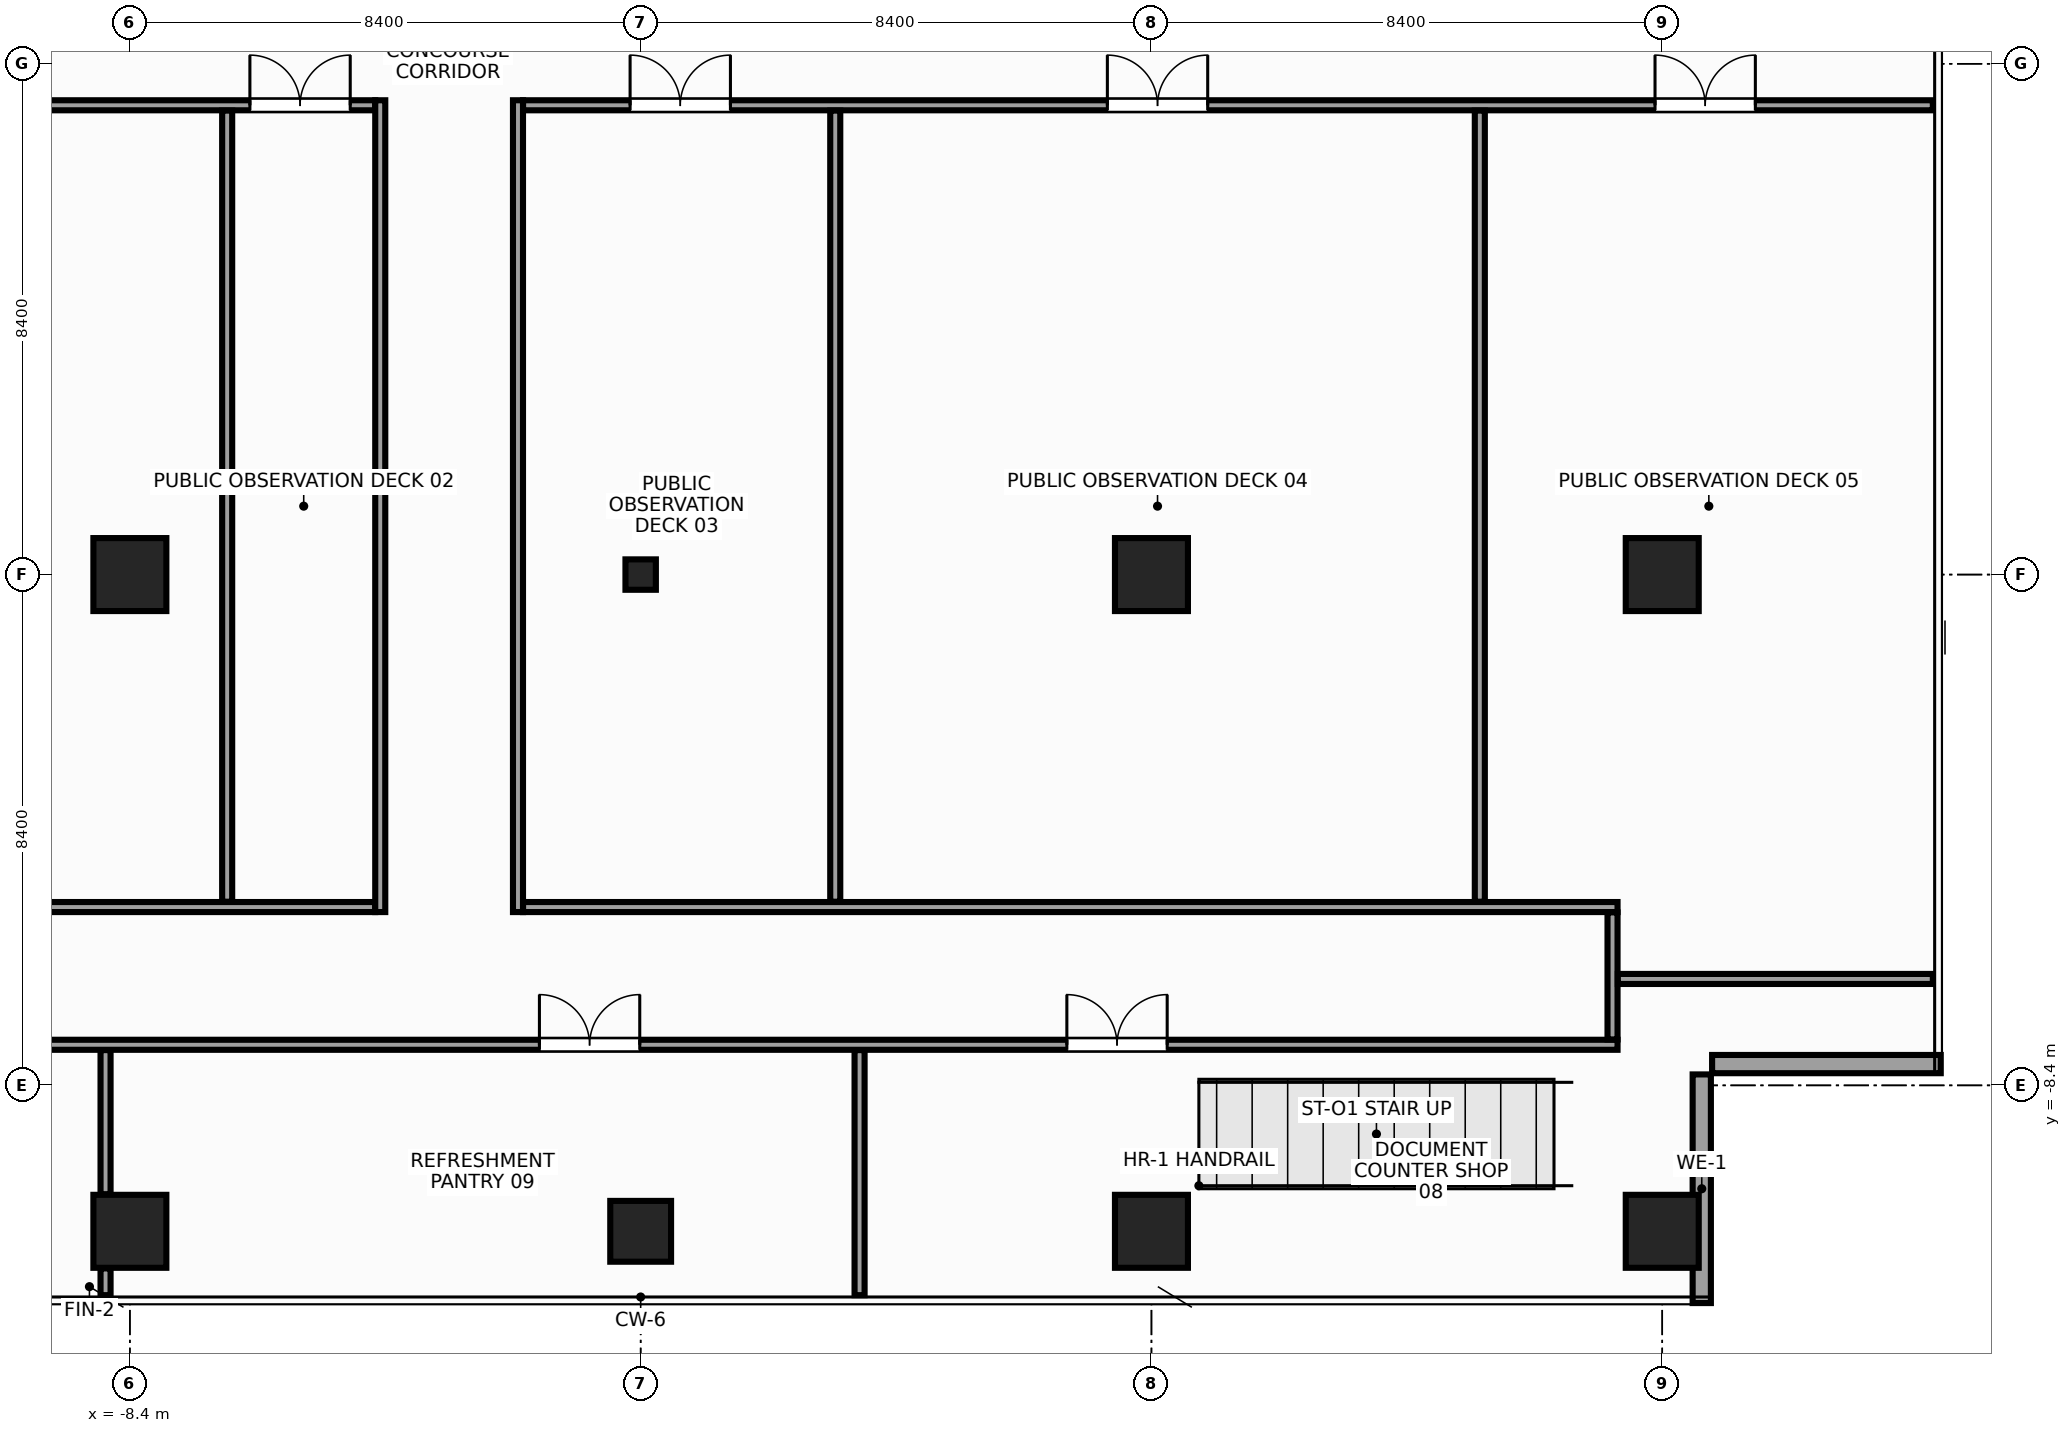
"""IFC4 building model, lengths in metres.
Left out: names, types, materials, properties, quantities, classifications, styles, units other than length and angle.
Written with IfcOpenShell. Run it as: python <this file> out.ifc"""

import sys

from ifc_helpers import new_model, si_unit, direction, frame, frame_2d, origin, origin_with_axes, origin_2d, place, context, subcontext, project, spatial, rectangle, hollow_rectangle, extrude, source, transform, mapped, element, fill, save


model = new_model("IFC4")
c1 = context("Model", 3, precision=1e-05, world=origin(), true_north=direction((0.0, 1.0)))
c2 = subcontext(c1, "Body", "Model", "MODEL_VIEW")
j1 = project(units=[si_unit("LENGTHUNIT", "METRE"), si_unit("PLANEANGLEUNIT", "RADIAN")], contexts=[c1])
p1 = place(None, origin())
s1 = spatial("IfcSite", under=j1, at=p1, CompositionType="ELEMENT")
p2 = place(p1, origin())
s2 = spatial("IfcBuilding", under=s1, at=p2, CompositionType="ELEMENT")
p3 = place(p2, frame((0.0, 0.0, 286.4)))
s3 = spatial("IfcBuildingStorey", under=s2, at=p3, CompositionType="ELEMENT", Elevation=286.4)
m1 = source(origin(), c2, "Body", "SweptSolid", [
    extrude(rectangle(XDim=1.2, YDim=1.2, at=origin_2d()), origin(), (0.0, 0.0, 1.0), 3.6),
])
for number, where, z_axis, x_axis in (
    (1, (16.8, -10.8, 0.0), (0.0, 0.0, 1.0), (1.0, 0.0, 0.0)),
    (2, (16.8, 0.0, 0.0), (0.0, 0.0, 1.0), (1.0, 0.0, 0.0)),
    (3, (-8.4, 0.0, 0.0), (0.0, 0.0, 1.0), (1.0, 0.0, 0.0)),
    (4, (-8.4, -10.8, 0.0), (0.0, 0.0, 1.0), (1.0, 0.0, 0.0)),
    (5, (8.4, 0.0, 0.0), (0.0, 0.0, 1.0), (1.0, 0.0, 0.0)),
    (6, (8.4, -10.8, 0.0), (0.0, 0.0, 1.0), (1.0, 0.0, 0.0)),
):
    element("IfcColumn", number, at=place(p3, frame(where, z_axis=z_axis, x_axis=x_axis)), inside=s3, PredefinedType="COLUMN", context=c2, shape_type="MappedRepresentation", body=[
        mapped(m1, transform((0.0, 0.0, 0.0), x_axis=(1.0, 0.0, 0.0), y_axis=(0.0, 1.0, 0.0), z_axis=(0.0, 0.0, 1.0), scale=1.0)),
    ])
m2 = source(origin(), c2, "Body", "SweptSolid", [
    extrude(rectangle(XDim=1.0, YDim=1.0, at=origin_2d()), origin(), (0.0, 0.0, 1.0), 3.6),
])
p4 = place(p3, frame((0.0, -10.8, 0.0), z_axis=(0.0, 0.0, 1.0), x_axis=(1.0, 0.0, 0.0)))
e7 = element("IfcColumn", 7, at=p4, inside=s3, PredefinedType="COLUMN", context=c2, shape_type="MappedRepresentation", body=[
    mapped(m2, transform((0.0, 0.0, 0.0), x_axis=(1.0, 0.0, 0.0), y_axis=(0.0, 1.0, 0.0), z_axis=(0.0, 0.0, 1.0), scale=1.0)),
])
m3 = source(origin(), c2, "Body", "SweptSolid", [
    extrude(hollow_rectangle(XDim=0.5, YDim=0.5, WallThickness=0.025, at=origin_2d()), origin(), (0.0, 0.0, 1.0), 3.6),
])
p5 = place(p3, origin_with_axes())
e8 = element("IfcColumn", 8, at=p5, inside=s3, PredefinedType="COLUMN", context=c2, shape_type="MappedRepresentation", body=[
    mapped(m3, transform((0.0, 0.0, 0.0), x_axis=(1.0, 0.0, 0.0), y_axis=(0.0, 1.0, 0.0), z_axis=(0.0, 0.0, 1.0), scale=1.0)),
])
m4 = source(origin(), c2, "Body", "SweptSolid", [
    extrude(rectangle(XDim=3.76, YDim=0.3, at=frame_2d((1.88, 0.0))), origin(), (0.0, 0.0, 1.0), 2.75),
])
p6 = place(p3, frame((17.45, -11.98, 0.0), z_axis=(0.0, 0.0, 1.0), x_axis=(0.0, 1.0, 0.0)))
e9 = element("IfcWall", 9, at=p6, inside=s3, PredefinedType="STANDARD", context=c2, shape_type="MappedRepresentation", body=[
    mapped(m4, transform((0.0, 0.0, 0.0), x_axis=(1.0, 0.0, 0.0), y_axis=(0.0, 1.0, 0.0), z_axis=(0.0, 0.0, 1.0), scale=1.0)),
])
m5 = source(origin(), c2, "Body", "SweptSolid", [
    extrude(rectangle(XDim=3.76, YDim=0.3, at=frame_2d((1.88, 0.0))), origin(), (0.0, 0.0, 1.0), 2.75),
])
p7 = place(p3, frame((17.62, -8.05, 0.0), z_axis=(0.0, 0.0, 1.0), x_axis=(1.0, 0.0, 0.0)))
e10 = element("IfcWall", 10, at=p7, inside=s3, PredefinedType="STANDARD", context=c2, shape_type="MappedRepresentation", body=[
    mapped(m5, transform((0.0, 0.0, 0.0), x_axis=(1.0, 0.0, 0.0), y_axis=(0.0, 1.0, 0.0), z_axis=(0.0, 0.0, 1.0), scale=1.0)),
])
m6 = source(origin(), c2, "Body", "SweptSolid", [
    extrude(rectangle(XDim=16.885, YDim=0.165, at=frame_2d((8.442, 0.0))), origin(), (0.0, 0.0, 1.0), 2.755),
])
p8 = place(p3, frame((-21.25, 7.718, 0.0), z_axis=(0.0, 0.0, 1.0), x_axis=(1.0, 0.0, 0.0)))
e11 = element("IfcWall", 11, at=p8, inside=s3, PredefinedType="PARTITIONING", context=c2, shape_type="MappedRepresentation", body=[
    mapped(m6, transform((0.0, 0.0, 0.0), x_axis=(1.0, 0.0, 0.0), y_axis=(0.0, 1.0, 0.0), z_axis=(0.0, 0.0, 1.0), scale=1.0)),
])
p9 = place(p8, frame((9.325, 0.0, 0.0)))
e12 = element("IfcOpeningElement", 12, at=p9, cuts=e11, PredefinedType="OPENING", context=c2, shape_type="SweptSolid", body=[
    extrude(rectangle(XDim=1.65, YDim=2.35, at=frame_2d((0.825, 1.175))), frame((0.0, 0.094, 0.0), z_axis=(0.0, -1.0, 0.0), x_axis=(1.0, 0.0, 0.0)), (0.0, 0.0, 1.0), 0.189),
])
p10 = place(p8, frame((14.824, 0.0, 0.0)))
e13 = element("IfcOpeningElement", 13, at=p10, cuts=e11, PredefinedType="OPENING", context=c2, shape_type="SweptSolid", body=[
    extrude(rectangle(XDim=1.65, YDim=2.35, at=frame_2d((0.825, 1.175))), frame((0.0, 0.094, 0.0), z_axis=(0.0, -1.0, 0.0), x_axis=(1.0, 0.0, 0.0)), (0.0, 0.0, 1.0), 0.189),
])
p11 = place(p8, frame((2.119, 0.0, 0.0)))
e14 = element("IfcOpeningElement", 14, at=p11, cuts=e11, PredefinedType="OPENING", context=c2, shape_type="SweptSolid", body=[
    extrude(rectangle(XDim=1.65, YDim=2.35, at=frame_2d((0.825, 1.175))), frame((0.0, 0.094, 0.0), z_axis=(0.0, -1.0, 0.0), x_axis=(1.0, 0.0, 0.0)), (0.0, 0.0, 1.0), 0.189),
])
m7 = source(origin(), c2, "Body", "SweptSolid", [
    extrude(rectangle(XDim=23.185, YDim=0.165, at=frame_2d((11.593, 0.0))), origin(), (0.0, 0.0, 1.0), 2.755),
])
p12 = place(p3, frame((-1.935, 7.718, 0.0), z_axis=(0.0, 0.0, 1.0), x_axis=(1.0, 0.0, 0.0)))
e15 = element("IfcWall", 15, at=p12, inside=s3, PredefinedType="PARTITIONING", context=c2, shape_type="MappedRepresentation", body=[
    mapped(m7, transform((0.0, 0.0, 0.0), x_axis=(1.0, 0.0, 0.0), y_axis=(0.0, 1.0, 0.0), z_axis=(0.0, 0.0, 1.0), scale=1.0)),
])
p13 = place(p12, frame((1.761, 0.0, 0.0)))
e16 = element("IfcOpeningElement", 16, at=p13, cuts=e15, PredefinedType="OPENING", context=c2, shape_type="SweptSolid", body=[
    extrude(rectangle(XDim=1.65, YDim=2.35, at=frame_2d((0.825, 1.175))), frame((0.0, 0.094, 0.0), z_axis=(0.0, -1.0, 0.0), x_axis=(1.0, 0.0, 0.0)), (0.0, 0.0, 1.0), 0.189),
])
p14 = place(p12, frame((9.61, 0.0, 0.0)))
e17 = element("IfcOpeningElement", 17, at=p14, cuts=e15, PredefinedType="OPENING", context=c2, shape_type="SweptSolid", body=[
    extrude(rectangle(XDim=1.65, YDim=2.35, at=frame_2d((0.825, 1.175))), frame((0.0, 0.094, 0.0), z_axis=(0.0, -1.0, 0.0), x_axis=(1.0, 0.0, 0.0)), (0.0, 0.0, 1.0), 0.189),
])
p15 = place(p12, frame((18.616, 0.0, 0.0)))
e18 = element("IfcOpeningElement", 18, at=p15, cuts=e15, PredefinedType="OPENING", context=c2, shape_type="SweptSolid", body=[
    extrude(rectangle(XDim=1.65, YDim=2.35, at=frame_2d((0.825, 1.175))), frame((0.0, 0.094, 0.0), z_axis=(0.0, -1.0, 0.0), x_axis=(1.0, 0.0, 0.0)), (0.0, 0.0, 1.0), 0.189),
])
m8 = source(origin(), c2, "Body", "SweptSolid", [
    extrude(rectangle(XDim=11.7, YDim=0.165, at=frame_2d((5.85, 0.0))), origin(), (0.0, 0.0, 1.0), 2.755),
])
p16 = place(p3, frame((-16.065, -5.468, 0.0), z_axis=(0.0, 0.0, 1.0), x_axis=(1.0, 0.0, 0.0)))
e19 = element("IfcWall", 19, at=p16, inside=s3, PredefinedType="PARTITIONING", context=c2, shape_type="MappedRepresentation", body=[
    mapped(m8, transform((0.0, 0.0, 0.0), x_axis=(1.0, 0.0, 0.0), y_axis=(0.0, 1.0, 0.0), z_axis=(0.0, 0.0, 1.0), scale=1.0)),
])
m9 = source(origin(), c2, "Body", "SweptSolid", [
    extrude(rectangle(XDim=18.0, YDim=0.165, at=frame_2d((9.0, 0.0))), origin(), (0.0, 0.0, 1.0), 2.755),
])
p17 = place(p3, frame((-1.935, -5.468, 0.0), z_axis=(0.0, 0.0, 1.0), x_axis=(1.0, 0.0, 0.0)))
e20 = element("IfcWall", 20, at=p17, inside=s3, PredefinedType="PARTITIONING", context=c2, shape_type="MappedRepresentation", body=[
    mapped(m9, transform((0.0, 0.0, 0.0), x_axis=(1.0, 0.0, 0.0), y_axis=(0.0, 1.0, 0.0), z_axis=(0.0, 0.0, 1.0), scale=1.0)),
])
m10 = source(origin(), c2, "Body", "SweptSolid", [
    extrude(rectangle(XDim=32.13, YDim=0.165, at=frame_2d((16.065, 0.0))), origin(), (0.0, 0.0, 1.0), 2.755),
])
p18 = place(p3, frame((-16.065, -7.732, 0.0), z_axis=(0.0, 0.0, 1.0), x_axis=(1.0, 0.0, 0.0)))
e21 = element("IfcWall", 21, at=p18, inside=s3, PredefinedType="PARTITIONING", context=c2, shape_type="MappedRepresentation", body=[
    mapped(m10, transform((0.0, 0.0, 0.0), x_axis=(1.0, 0.0, 0.0), y_axis=(0.0, 1.0, 0.0), z_axis=(0.0, 0.0, 1.0), scale=1.0)),
])
p19 = place(p18, frame((2.826, 0.0, 0.0)))
e22 = element("IfcOpeningElement", 22, at=p19, cuts=e21, PredefinedType="OPENING", context=c2, shape_type="SweptSolid", body=[
    extrude(rectangle(XDim=1.65, YDim=2.35, at=frame_2d((0.825, 1.175))), frame((0.0, 0.094, 0.0), z_axis=(0.0, -1.0, 0.0), x_axis=(1.0, 0.0, 0.0)), (0.0, 0.0, 1.0), 0.189),
])
p20 = place(p18, frame((23.074, 0.0, 0.0)))
e23 = element("IfcOpeningElement", 23, at=p20, cuts=e21, PredefinedType="OPENING", context=c2, shape_type="SweptSolid", body=[
    extrude(rectangle(XDim=1.65, YDim=2.35, at=frame_2d((0.825, 1.175))), frame((0.0, 0.094, 0.0), z_axis=(0.0, -1.0, 0.0), x_axis=(1.0, 0.0, 0.0)), (0.0, 0.0, 1.0), 0.189),
])
p21 = place(p18, frame((14.4, 0.0, 0.0)))
e24 = element("IfcOpeningElement", 24, at=p21, cuts=e21, PredefinedType="OPENING", context=c2, shape_type="SweptSolid", body=[
    extrude(rectangle(XDim=1.65, YDim=2.35, at=frame_2d((0.825, 1.175))), frame((0.0, 0.094, 0.0), z_axis=(0.0, -1.0, 0.0), x_axis=(1.0, 0.0, 0.0)), (0.0, 0.0, 1.0), 0.189),
])
m11 = source(origin(), c2, "Body", "SweptSolid", [
    extrude(rectangle(XDim=13.35, YDim=0.165, at=frame_2d((6.675, 0.0))), origin(), (0.0, 0.0, 1.0), 2.655),
])
for number, where, z_axis, x_axis in (
    (25, (-4.282, -5.55, 0.0), (0.0, 0.0, 1.0), (0.0, 1.0, 0.0)),
    (26, (-2.018, -5.55, 0.0), (0.0, 0.0, 1.0), (0.0, 1.0, 0.0)),
):
    element("IfcWall", number, at=place(p3, frame(where, z_axis=z_axis, x_axis=x_axis)), inside=s3, PredefinedType="PARTITIONING", context=c2, shape_type="MappedRepresentation", body=[
        mapped(m11, transform((0.0, 0.0, 0.0), x_axis=(1.0, 0.0, 0.0), y_axis=(0.0, 1.0, 0.0), z_axis=(0.0, 0.0, 1.0), scale=1.0)),
    ])
m12 = source(origin(), c2, "Body", "SweptSolid", [
    extrude(rectangle(XDim=2.09, YDim=0.165, at=frame_2d((1.045, 0.0))), origin(), (0.0, 0.0, 1.0), 3.37),
])
p22 = place(p3, frame((15.982, -7.645, 0.0), z_axis=(0.0, 0.0, 1.0), x_axis=(0.0, 1.0, 0.0)))
e27 = element("IfcWall", 27, at=p22, inside=s3, PredefinedType="PARTITIONING", context=c2, shape_type="MappedRepresentation", body=[
    mapped(m12, transform((0.0, 0.0, 0.0), x_axis=(1.0, 0.0, 0.0), y_axis=(0.0, 1.0, 0.0), z_axis=(0.0, 0.0, 1.0), scale=1.0)),
])
m13 = source(origin(), c2, "Body", "SweptSolid", [
    extrude(rectangle(XDim=5.18, YDim=0.165, at=frame_2d((2.59, 0.0))), origin(), (0.0, 0.0, 1.0), 2.755),
])
p23 = place(p3, frame((16.07, -6.65, 0.0), z_axis=(0.0, 0.0, 1.0), x_axis=(1.0, 0.0, 0.0)))
e28 = element("IfcWall", 28, at=p23, inside=s3, PredefinedType="PARTITIONING", context=c2, shape_type="MappedRepresentation", body=[
    mapped(m13, transform((0.0, 0.0, 0.0), x_axis=(1.0, 0.0, 0.0), y_axis=(0.0, 1.0, 0.0), z_axis=(0.0, 0.0, 1.0), scale=1.0)),
])
m14 = source(origin(), c2, "Body", "SweptSolid", [
    extrude(rectangle(XDim=13.01, YDim=0.165, at=frame_2d((6.505, 0.0))), origin(), (0.0, 0.0, 1.0), 2.655),
])
for number, where, z_axis, x_axis in (
    (29, (-6.8, -5.38, 0.0), (0.0, 0.0, 1.0), (0.0, 1.0, 0.0)),
    (30, (3.2, -5.38, 0.0), (0.0, 0.0, 1.0), (0.0, 1.0, 0.0)),
    (31, (13.8, -5.38, 0.0), (0.0, 0.0, 1.0), (0.0, 1.0, 0.0)),
):
    element("IfcWall", number, at=place(p3, frame(where, z_axis=z_axis, x_axis=x_axis)), inside=s3, PredefinedType="PARTITIONING", context=c2, shape_type="MappedRepresentation", body=[
        mapped(m14, transform((0.0, 0.0, 0.0), x_axis=(1.0, 0.0, 0.0), y_axis=(0.0, 1.0, 0.0), z_axis=(0.0, 0.0, 1.0), scale=1.0)),
    ])
m15 = source(origin(), c2, "Body", "SweptSolid", [
    extrude(rectangle(XDim=0.44, YDim=0.165, at=frame_2d((0.22, 0.0))), origin(), (0.0, 0.0, 1.0), 3.37),
])
p24 = place(p3, frame((-8.8, -11.85, 0.0), z_axis=(0.0, 0.0, 1.0), x_axis=(0.0, 1.0, 0.0)))
e32 = element("IfcWall", 32, at=p24, inside=s3, PredefinedType="PARTITIONING", context=c2, shape_type="MappedRepresentation", body=[
    mapped(m15, transform((0.0, 0.0, 0.0), x_axis=(1.0, 0.0, 0.0), y_axis=(0.0, 1.0, 0.0), z_axis=(0.0, 0.0, 1.0), scale=1.0)),
])
m16 = source(origin(), c2, "Body", "SweptSolid", [
    extrude(rectangle(XDim=2.37, YDim=0.165, at=frame_2d((1.185, 0.0))), origin(), (0.0, 0.0, 1.0), 3.37),
])
p25 = place(p3, frame((-8.8, -10.19, 0.0), z_axis=(0.0, 0.0, 1.0), x_axis=(0.0, 1.0, 0.0)))
e33 = element("IfcWall", 33, at=p25, inside=s3, PredefinedType="PARTITIONING", context=c2, shape_type="MappedRepresentation", body=[
    mapped(m16, transform((0.0, 0.0, 0.0), x_axis=(1.0, 0.0, 0.0), y_axis=(0.0, 1.0, 0.0), z_axis=(0.0, 0.0, 1.0), scale=1.0)),
])
m17 = source(origin(), c2, "Body", "SweptSolid", [
    extrude(rectangle(XDim=4.03, YDim=0.165, at=frame_2d((2.015, 0.0))), origin(), (0.0, 0.0, 1.0), 2.905),
])
p26 = place(p3, frame((3.6, -11.85, 0.0), z_axis=(0.0, 0.0, 1.0), x_axis=(0.0, 1.0, 0.0)))
e34 = element("IfcWall", 34, at=p26, inside=s3, PredefinedType="PARTITIONING", context=c2, shape_type="MappedRepresentation", body=[
    mapped(m17, transform((0.0, 0.0, 0.0), x_axis=(1.0, 0.0, 0.0), y_axis=(0.0, 1.0, 0.0), z_axis=(0.0, 0.0, 1.0), scale=1.0)),
])
m18 = source(origin(), c2, "Body", "SweptSolid", [
    extrude(rectangle(XDim=1.65, YDim=2.35, at=frame_2d((0.825, 1.175))), frame((0.0, 0.025, 0.0), z_axis=(0.0, -1.0, 0.0), x_axis=(1.0, 0.0, 0.0)), (0.0, 0.0, 1.0), 0.05),
])
p27 = place(p10, origin())
e35 = element("IfcDoor", 35, at=p27, inside=s3, OperationType="DOUBLE_DOOR_SINGLE_SWING", PredefinedType="DOOR", context=c2, shape_type="MappedRepresentation", body=[
    mapped(m18, transform((0.0, 0.0, 0.0), x_axis=(1.0, 0.0, 0.0), y_axis=(0.0, 1.0, 0.0), z_axis=(0.0, 0.0, 1.0), scale=1.0)),
])
fill(e13, e35)
p28 = place(p13, origin())
e36 = element("IfcDoor", 36, at=p28, inside=s3, OperationType="DOUBLE_DOOR_SINGLE_SWING", PredefinedType="DOOR", context=c2, shape_type="MappedRepresentation", body=[
    mapped(m18, transform((0.0, 0.0, 0.0), x_axis=(1.0, 0.0, 0.0), y_axis=(0.0, 1.0, 0.0), z_axis=(0.0, 0.0, 1.0), scale=1.0)),
])
fill(e16, e36)
p29 = place(p14, origin())
e37 = element("IfcDoor", 37, at=p29, inside=s3, OperationType="DOUBLE_DOOR_SINGLE_SWING", PredefinedType="DOOR", context=c2, shape_type="MappedRepresentation", body=[
    mapped(m18, transform((0.0, 0.0, 0.0), x_axis=(1.0, 0.0, 0.0), y_axis=(0.0, 1.0, 0.0), z_axis=(0.0, 0.0, 1.0), scale=1.0)),
])
fill(e17, e37)
p30 = place(p15, origin())
e38 = element("IfcDoor", 38, at=p30, inside=s3, OperationType="DOUBLE_DOOR_SINGLE_SWING", PredefinedType="DOOR", context=c2, shape_type="MappedRepresentation", body=[
    mapped(m18, transform((0.0, 0.0, 0.0), x_axis=(1.0, 0.0, 0.0), y_axis=(0.0, 1.0, 0.0), z_axis=(0.0, 0.0, 1.0), scale=1.0)),
])
fill(e18, e38)
p31 = place(p20, origin())
e39 = element("IfcDoor", 39, at=p31, inside=s3, OperationType="DOUBLE_DOOR_SINGLE_SWING", PredefinedType="DOOR", context=c2, shape_type="MappedRepresentation", body=[
    mapped(m18, transform((0.0, 0.0, 0.0), x_axis=(1.0, 0.0, 0.0), y_axis=(0.0, 1.0, 0.0), z_axis=(0.0, 0.0, 1.0), scale=1.0)),
])
fill(e23, e39)
p32 = place(p21, origin())
e40 = element("IfcDoor", 40, at=p32, inside=s3, OperationType="DOUBLE_DOOR_SINGLE_SWING", PredefinedType="DOOR", context=c2, shape_type="MappedRepresentation", body=[
    mapped(m18, transform((0.0, 0.0, 0.0), x_axis=(1.0, 0.0, 0.0), y_axis=(0.0, 1.0, 0.0), z_axis=(0.0, 0.0, 1.0), scale=1.0)),
])
fill(e24, e40)
save(model, sys.argv[1])
